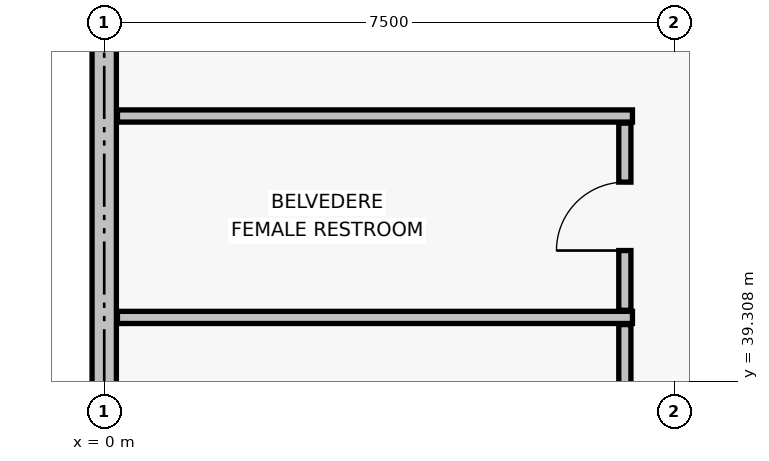
"""IFC4 building model, lengths in metres.
Left out: names, types, materials, properties, quantities, classifications, styles, units other than length and angle.
Written with IfcOpenShell. Run it as: python <this file> out.ifc"""

import sys

from ifc_helpers import new_model, si_unit, direction, frame, frame_2d, origin, place, context, subcontext, project, spatial, rectangle, extrude, element, fill, save


model = new_model("IFC4")
c1 = context("Model", 3, precision=1e-05, world=origin(), true_north=direction((0.0, 1.0)))
c2 = subcontext(c1, "Body", "Model", "MODEL_VIEW")
j1 = project(units=[si_unit("LENGTHUNIT", "METRE"), si_unit("PLANEANGLEUNIT", "RADIAN")], contexts=[c1])
p1 = place(None, origin())
s1 = spatial("IfcSite", under=j1, at=p1, CompositionType="ELEMENT")
p2 = place(p1, origin())
s2 = spatial("IfcBuilding", under=s1, at=p2, CompositionType="ELEMENT")
p3 = place(p2, frame((0.0, 0.0, 17.1)))
s3 = spatial("IfcBuildingStorey", under=s2, at=p3, CompositionType="ELEMENT", Elevation=17.1)
p4 = place(p3, frame((0.0, 37.765, 0.0), z_axis=(0.0, 0.0, 1.0), x_axis=(0.0, 1.0, 0.0)))
e1 = element("IfcWall", 1, at=p4, inside=s3, PredefinedType="SOLIDWALL", context=c2, shape_type="SweptSolid", body=[
    extrude(rectangle(XDim=6.97, YDim=0.32, at=frame_2d((3.485, 0.0))), origin(), (0.0, 0.0, 1.0), 2.59),
])
for number, where, z_axis, x_axis in (
    (2, (0.174, 40.15, 0.0), (0.0, 0.0, 1.0), (1.0, 0.0, 0.0)),
    (3, (0.174, 42.8, 0.0), (0.0, 0.0, 1.0), (1.0, 0.0, 0.0)),
):
    element("IfcWall", number, at=place(p3, frame(where, z_axis=z_axis, x_axis=x_axis)), inside=s3, PredefinedType="PARTITIONING", context=c2, shape_type="SweptSolid", body=[
        extrude(rectangle(XDim=6.776, YDim=0.16, at=frame_2d((3.388, 0.0))), origin(), (0.0, 0.0, 1.0), 2.84),
    ])
p5 = place(p3, frame((6.85, 37.594, 0.0), z_axis=(0.0, 0.0, 1.0), x_axis=(0.0, 1.0, 0.0)))
e4 = element("IfcWall", 4, at=p5, inside=s3, PredefinedType="PARTITIONING", context=c2, shape_type="SweptSolid", body=[
    extrude(rectangle(XDim=2.462, YDim=0.16, at=frame_2d((1.231, 0.0))), origin(), (0.0, 0.0, 1.0), 2.59),
])
p6 = place(p5, frame((0.776, 0.0, 0.0)))
e5 = element("IfcOpeningElement", 5, at=p6, cuts=e4, PredefinedType="OPENING", context=c2, shape_type="SweptSolid", body=[
    extrude(rectangle(XDim=0.9, YDim=2.1, at=frame_2d((0.45, 1.05))), frame((0.0, 0.09, 0.0), z_axis=(0.0, -1.0, 0.0), x_axis=(1.0, 0.0, 0.0)), (0.0, 0.0, 1.0), 0.18),
])
p7 = place(p3, frame((6.85, 40.244, 0.0), z_axis=(0.0, 0.0, 1.0), x_axis=(0.0, 1.0, 0.0)))
e6 = element("IfcWall", 6, at=p7, inside=s3, PredefinedType="PARTITIONING", context=c2, shape_type="SweptSolid", body=[
    extrude(rectangle(XDim=2.462, YDim=0.16, at=frame_2d((1.231, 0.0))), origin(), (0.0, 0.0, 1.0), 2.97),
])
p8 = place(p7, frame((0.786, 0.0, 0.0)))
e7 = element("IfcOpeningElement", 7, at=p8, cuts=e6, PredefinedType="OPENING", context=c2, shape_type="SweptSolid", body=[
    extrude(rectangle(XDim=0.9, YDim=2.1, at=frame_2d((0.45, 1.05))), frame((0.0, 0.09, 0.0), z_axis=(0.0, -1.0, 0.0), x_axis=(1.0, 0.0, 0.0)), (0.0, 0.0, 1.0), 0.18),
])
p9 = place(p8, origin())
e8 = element("IfcDoor", 8, at=p9, inside=s3, OperationType="SINGLE_SWING_LEFT", PredefinedType="DOOR", context=c2, shape_type="SweptSolid", body=[
    extrude(rectangle(XDim=0.9, YDim=2.1, at=frame_2d((0.45, 1.05))), frame((0.0, 0.025, 0.0), z_axis=(0.0, -1.0, 0.0), x_axis=(1.0, 0.0, 0.0)), (0.0, 0.0, 1.0), 0.05),
])
fill(e7, e8)
save(model, sys.argv[1])
